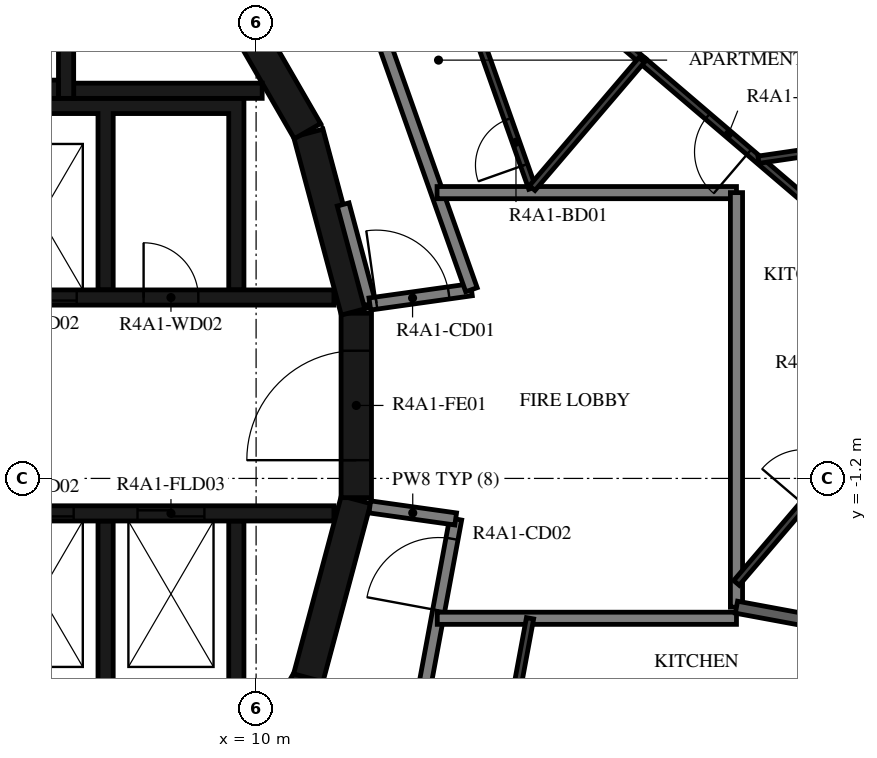
"""IFC4 building model, lengths in metres.
Left out: names, types, materials, properties, quantities, classifications, styles, units other than length and angle.
Written with IfcOpenShell. Run it as: python <this file> out.ifc"""

import sys

from ifc_helpers import new_model, si_unit, direction, frame, frame_2d, origin, place, context, subcontext, project, spatial, polyline, rectangle, outline, extrude, element, fill, save


model = new_model("IFC4")
c1 = context("Model", 3, precision=1e-05, world=origin(), true_north=direction((0.0, 1.0)))
c2 = subcontext(c1, "Body", "Model", "MODEL_VIEW")
j1 = project(units=[si_unit("LENGTHUNIT", "METRE"), si_unit("PLANEANGLEUNIT", "RADIAN")], contexts=[c1])
p1 = place(None, origin())
s1 = spatial("IfcSite", under=j1, at=p1, CompositionType="ELEMENT")
p2 = place(p1, origin())
s2 = spatial("IfcBuilding", under=s1, at=p2, CompositionType="ELEMENT")
p3 = place(p2, frame((0.0, 0.0, 155.2)))
s3 = spatial("IfcBuildingStorey", under=s2, at=p3, CompositionType="ELEMENT", Elevation=155.2)
for number, where, z_axis, x_axis in (
    (1, (9.329, -7.137, 0.0), (0.0, 0.0, 1.0), (0.5, 0.866, 0.0)),
    (2, (10.858, -4.479, 0.0), (0.0, 0.0, 1.0), (0.259, 0.966, 0.0)),
):
    element("IfcWall", number, at=place(p3, frame(where, z_axis=z_axis, x_axis=x_axis)), inside=s3, PredefinedType="SHEAR", context=c2, shape_type="SweptSolid", body=[
        extrude(rectangle(XDim=3.033, YDim=0.5, at=frame_2d((1.516, 0.0))), origin(), (0.0, 0.0, 1.0), 3.12),
    ])
p4 = place(p3, frame((11.647, -1.516, 0.0), z_axis=(0.0, 0.0, 1.0), x_axis=(0.0, 1.0, 0.0)))
e3 = element("IfcWall", 3, at=p4, inside=s3, PredefinedType="SHEAR", context=c2, shape_type="SweptSolid", body=[
    extrude(rectangle(XDim=3.033, YDim=0.5, at=frame_2d((1.516, 0.0))), origin(), (0.0, 0.0, 1.0), 3.12),
])
p5 = place(p4, frame((0.616, 0.0, 0.0)))
e4 = element("IfcOpeningElement", 4, at=p5, cuts=e3, PredefinedType="OPENING", context=c2, shape_type="SweptSolid", body=[
    extrude(rectangle(XDim=1.8, YDim=2.1, at=frame_2d((0.9, 1.05))), frame((0.0, 0.26, 0.0), z_axis=(0.0, -1.0, 0.0), x_axis=(1.0, 0.0, 0.0)), (0.0, 0.0, 1.0), 0.52),
])
for number, where, z_axis, x_axis in (
    (5, (11.643, 1.55, 0.0), (0.0, 0.0, 1.0), (-0.259, 0.966, 0.0)),
    (6, (10.845, 4.51, 0.0), (0.0, 0.0, 1.0), (-0.5, 0.866, 0.0)),
):
    element("IfcWall", number, at=place(p3, frame(where, z_axis=z_axis, x_axis=x_axis)), inside=s3, PredefinedType="SHEAR", context=c2, shape_type="SweptSolid", body=[
        extrude(rectangle(XDim=3.033, YDim=0.5, at=frame_2d((1.516, 0.0))), origin(), (0.0, 0.0, 1.0), 3.12),
    ])
p6 = place(p3, frame((0.0, 5.2, 0.0), z_axis=(0.0, 0.0, 1.0), x_axis=(1.0, 0.0, 0.0)))
e7 = element("IfcWall", 7, at=p6, inside=s3, PredefinedType="SHEAR", context=c2, shape_type="SweptSolid", body=[
    extrude(rectangle(XDim=6.75, YDim=0.3, at=frame_2d((3.375, 0.0))), origin(), (0.0, 0.0, 1.0), 3.12),
])
p7 = place(p3, frame((6.875, 5.05, 0.0), z_axis=(0.0, 0.0, 1.0), x_axis=(0.0, 1.0, 0.0)))
e8 = element("IfcWall", 8, at=p7, inside=s3, PredefinedType="SHEAR", context=c2, shape_type="SweptSolid", body=[
    extrude(rectangle(XDim=3.92, YDim=0.25, at=frame_2d((1.96, 0.0))), origin(), (0.0, 0.0, 1.0), 3.12),
])
p8 = place(p7, frame((1.11, 0.0, 0.0)))
e9 = element("IfcOpeningElement", 9, at=p8, cuts=e8, PredefinedType="OPENING", context=c2, shape_type="SweptSolid", body=[
    extrude(rectangle(XDim=1.2, YDim=2.1, at=frame_2d((0.6, 1.05))), frame((0.0, 0.135, 0.0), z_axis=(0.0, -1.0, 0.0), x_axis=(1.0, 0.0, 0.0)), (0.0, 0.0, 1.0), 0.27),
])
p9 = place(p3, frame((7.0, 5.175, 0.0), z_axis=(0.0, 0.0, 1.0), x_axis=(1.0, 0.0, 0.0)))
e10 = element("IfcWall", 10, at=p9, inside=s3, PredefinedType="SHEAR", context=c2, shape_type="SweptSolid", body=[
    extrude(rectangle(XDim=3.1, YDim=0.25, at=frame_2d((1.55, 0.0))), origin(), (0.0, 0.0, 1.0), 3.12),
])
p10 = place(p3, origin())
e11 = element("IfcWall", 11, at=p10, inside=s3, PredefinedType="SHEAR", context=c2, shape_type="SweptSolid", body=[
    extrude(outline(polyline([(-9.55, 4.8), (-1.2, 4.8), (-1.2, 1.9), (-0.95, 1.9), (-0.95, 4.8), (0.95, 4.8), (0.95, 1.9), (1.2, 1.9), (1.2, 4.8), (3.1, 4.8), (3.1, 1.9), (3.35, 1.9), (3.35, 4.8), (5.25, 4.8), (5.25, 1.9), (5.5, 1.9), (5.5, 4.8), (7.4, 4.8), (7.4, 1.9), (7.65, 1.9), (7.65, 4.8), (9.55, 4.8), (9.55, 1.9), (9.8, 1.9), (9.8, 4.8), (9.8, 5.05), (-9.8, 5.05), (-9.8, 4.8), (-9.8, 1.9), (-9.55, 1.9), (-9.55, 4.8)])), origin(), (0.0, 0.0, 1.0), 3.12),
])
p11 = place(p3, origin())
e12 = element("IfcWall", 12, at=p11, inside=s3, PredefinedType="SHEAR", context=c2, shape_type="SweptSolid", body=[
    extrude(outline(polyline([(9.8, -5.05), (9.8, -4.8), (9.8, -1.9), (9.55, -1.9), (9.55, -4.8), (7.65, -4.8), (7.65, -1.9), (7.4, -1.9), (7.4, -4.8), (5.5, -4.8), (5.5, -1.9), (5.25, -1.9), (5.25, -4.8), (3.35, -4.8), (3.35, -1.9), (3.1, -1.9), (3.1, -4.8), (1.2, -4.8), (1.2, -1.9), (0.95, -1.9), (0.95, -4.8), (-0.95, -4.8), (-0.95, -1.9), (-1.2, -1.9), (-1.2, -4.8), (-3.1, -4.8), (-3.1, -1.9), (-3.35, -1.9), (-3.35, -4.8), (-5.25, -4.8), (-5.25, -1.9), (-5.5, -1.9), (-5.5, -4.8), (-7.4, -4.8), (-7.4, -1.9), (-7.65, -1.9), (-7.65, -4.8), (-9.55, -4.8), (-9.55, -1.9), (-9.8, -1.9), (-9.8, -4.8), (-9.8, -5.05), (9.8, -5.05)])), origin(), (0.0, 0.0, 1.0), 3.12),
])
p12 = place(p3, frame((3.35, 1.775, 0.0), z_axis=(0.0, 0.0, 1.0), x_axis=(1.0, 0.0, 0.0)))
e13 = element("IfcWall", 13, at=p12, inside=s3, PredefinedType="SHEAR", context=c2, shape_type="SweptSolid", body=[
    extrude(rectangle(XDim=7.93, YDim=0.25, at=frame_2d((3.965, 0.0))), origin(), (0.0, 0.0, 1.0), 3.12),
])
p13 = place(p12, frame((0.35, 0.0, 0.0)))
e14 = element("IfcOpeningElement", 14, at=p13, cuts=e13, PredefinedType="OPENING", context=c2, shape_type="SweptSolid", body=[
    extrude(rectangle(XDim=1.2, YDim=2.4, at=frame_2d((0.6, 1.2))), frame((0.0, 0.135, 0.0), z_axis=(0.0, -1.0, 0.0), x_axis=(1.0, 0.0, 0.0)), (0.0, 0.0, 1.0), 0.27),
])
p14 = place(p12, frame((2.5, 0.0, 0.0)))
e15 = element("IfcOpeningElement", 15, at=p14, cuts=e13, PredefinedType="OPENING", context=c2, shape_type="SweptSolid", body=[
    extrude(rectangle(XDim=1.2, YDim=2.4, at=frame_2d((0.6, 1.2))), frame((0.0, 0.135, 0.0), z_axis=(0.0, -1.0, 0.0), x_axis=(1.0, 0.0, 0.0)), (0.0, 0.0, 1.0), 0.27),
])
p15 = place(p12, frame((4.8, 0.0, 0.0)))
e16 = element("IfcOpeningElement", 16, at=p15, cuts=e13, PredefinedType="OPENING", context=c2, shape_type="SweptSolid", body=[
    extrude(rectangle(XDim=0.9, YDim=2.1, at=frame_2d((0.45, 1.05))), frame((0.0, 0.135, 0.0), z_axis=(0.0, -1.0, 0.0), x_axis=(1.0, 0.0, 0.0)), (0.0, 0.0, 1.0), 0.27),
])
p16 = place(p3, frame((3.35, -1.775, 0.0), z_axis=(0.0, 0.0, 1.0), x_axis=(1.0, 0.0, 0.0)))
e17 = element("IfcWall", 17, at=p16, inside=s3, PredefinedType="SHEAR", context=c2, shape_type="SweptSolid", body=[
    extrude(rectangle(XDim=7.93, YDim=0.25, at=frame_2d((3.965, 0.0))), origin(), (0.0, 0.0, 1.0), 3.12),
])
p17 = place(p16, frame((0.4, 0.0, 0.0)))
e18 = element("IfcOpeningElement", 18, at=p17, cuts=e17, PredefinedType="OPENING", context=c2, shape_type="SweptSolid", body=[
    extrude(rectangle(XDim=1.1, YDim=2.4, at=frame_2d((0.55, 1.2))), frame((0.0, 0.135, 0.0), z_axis=(0.0, -1.0, 0.0), x_axis=(1.0, 0.0, 0.0)), (0.0, 0.0, 1.0), 0.27),
])
p18 = place(p16, frame((2.55, 0.0, 0.0)))
e19 = element("IfcOpeningElement", 19, at=p18, cuts=e17, PredefinedType="OPENING", context=c2, shape_type="SweptSolid", body=[
    extrude(rectangle(XDim=1.1, YDim=2.4, at=frame_2d((0.55, 1.2))), frame((0.0, 0.135, 0.0), z_axis=(0.0, -1.0, 0.0), x_axis=(1.0, 0.0, 0.0)), (0.0, 0.0, 1.0), 0.27),
])
p19 = place(p16, frame((4.7, 0.0, 0.0)))
e20 = element("IfcOpeningElement", 20, at=p19, cuts=e17, PredefinedType="OPENING", context=c2, shape_type="SweptSolid", body=[
    extrude(rectangle(XDim=1.1, YDim=2.4, at=frame_2d((0.55, 1.2))), frame((0.0, 0.135, 0.0), z_axis=(0.0, -1.0, 0.0), x_axis=(1.0, 0.0, 0.0)), (0.0, 0.0, 1.0), 0.27),
])
p20 = place(p3, frame((11.87, 1.668, 0.0), z_axis=(0.0, 0.0, 1.0), x_axis=(-0.258836880648, 0.965921047093, 0.0)))
e21 = element("IfcWall", 21, at=p20, inside=s3, PredefinedType="STANDARD", context=c2, shape_type="SweptSolid", body=[
    extrude(rectangle(XDim=1.695, YDim=0.2, at=frame_2d((0.848, 0.0))), origin(), (0.0, 0.0, 1.0), 3.12),
])
p21 = place(p3, frame((11.87, 1.668, 0.0), z_axis=(0.0, 0.0, 1.0), x_axis=(0.990270910415, 0.139152879904, 0.0)))
e22 = element("IfcWall", 22, at=p21, inside=s3, PredefinedType="STANDARD", context=c2, shape_type="SweptSolid", body=[
    extrude(rectangle(XDim=1.688, YDim=0.2, at=frame_2d((0.844, 0.0))), origin(), (0.0, 0.0, 1.0), 3.12),
])
p22 = place(p21, frame((0.11, 0.0, 0.0)))
e23 = element("IfcOpeningElement", 23, at=p22, cuts=e22, PredefinedType="OPENING", context=c2, shape_type="SweptSolid", body=[
    extrude(rectangle(XDim=1.2, YDim=2.1, at=frame_2d((0.6, 1.05))), frame((0.0, 0.11, 0.0), z_axis=(0.0, -1.0, 0.0), x_axis=(1.0, 0.0, 0.0)), (0.0, 0.0, 1.0), 0.22),
])
p23 = place(p3, frame((13.542, 1.903, 0.0), z_axis=(0.0, 0.0, 1.0), x_axis=(-0.333808508206, 0.942640907159, 0.0)))
e24 = element("IfcWall", 24, at=p23, inside=s3, PredefinedType="STANDARD", context=c2, shape_type="SweptSolid", body=[
    extrude(rectangle(XDim=6.317, YDim=0.2, at=frame_2d((3.158, 0.0))), origin(), (0.0, 0.0, 1.0), 3.12),
])
p24 = place(p3, frame((12.521, -5.972, 0.0), z_axis=(0.0, 0.0, 1.0), x_axis=(0.182244189886, 0.983253301674, 0.0)))
e25 = element("IfcWall", 25, at=p24, inside=s3, PredefinedType="STANDARD", context=c2, shape_type="SweptSolid", body=[
    extrude(rectangle(XDim=4.176, YDim=0.2, at=frame_2d((2.088, 0.0))), origin(), (0.0, 0.0, 1.0), 3.12),
])
p25 = place(p24, frame((2.645, 0.0, 0.0)))
e26 = element("IfcOpeningElement", 26, at=p25, cuts=e25, PredefinedType="OPENING", context=c2, shape_type="SweptSolid", body=[
    extrude(rectangle(XDim=1.2, YDim=2.1, at=frame_2d((0.6, 1.05))), frame((0.0, 0.11, 0.0), z_axis=(0.0, -1.0, 0.0), x_axis=(1.0, 0.0, 0.0)), (0.0, 0.0, 1.0), 0.22),
])
p26 = place(p3, frame((13.282, -1.867, 0.0), z_axis=(0.0, 0.0, 1.0), x_axis=(-0.990265430288, 0.139191873241, 0.0)))
e27 = element("IfcWall", 27, at=p26, inside=s3, PredefinedType="STANDARD", context=c2, shape_type="SweptSolid", body=[
    extrude(rectangle(XDim=1.426, YDim=0.2, at=frame_2d((0.713, 0.0))), origin(), (0.0, 0.0, 1.0), 3.12),
])
p27 = place(p3, frame((17.9, 3.5, 0.0), z_axis=(0.0, 0.0, 1.0), x_axis=(-1.0, 0.0, 0.0)))
e28 = element("IfcWall", 28, at=p27, inside=s3, PredefinedType="STANDARD", context=c2, shape_type="SweptSolid", body=[
    extrude(rectangle(XDim=4.924, YDim=0.2, at=frame_2d((2.462, 0.0))), origin(), (0.0, 0.0, 1.0), 3.12),
])
p28 = place(p3, frame((17.9, -3.318, 0.0), z_axis=(0.0, 0.0, 1.0), x_axis=(0.0, 1.0, 0.0)))
e29 = element("IfcWall", 29, at=p28, inside=s3, PredefinedType="STANDARD", context=c2, shape_type="SweptSolid", body=[
    extrude(rectangle(XDim=6.818, YDim=0.2, at=frame_2d((3.409, 0.0))), origin(), (0.0, 0.0, 1.0), 3.12),
])
p29 = place(p3, frame((12.979, -3.5, 0.0), z_axis=(0.0, 0.0, 1.0), x_axis=(1.0, 0.0, 0.0)))
e30 = element("IfcWall", 30, at=p29, inside=s3, PredefinedType="STANDARD", context=c2, shape_type="SweptSolid", body=[
    extrude(rectangle(XDim=4.92, YDim=0.2, at=frame_2d((2.46, 0.0))), origin(), (0.0, 0.0, 1.0), 3.12),
])
p30 = place(p3, frame((17.9, -3.318, 0.0), z_axis=(0.0, 0.0, 1.0), x_axis=(0.983252800712, -0.182246892682, 0.0)))
e31 = element("IfcWall", 31, at=p30, inside=s3, PredefinedType="STANDARD", context=c2, shape_type="SweptSolid", body=[
    extrude(rectangle(XDim=1.386, YDim=0.2, at=frame_2d((0.693, 0.0))), origin(), (0.0, 0.0, 1.0), 3.12),
])
p31 = place(p3, frame((14.541, 3.575, 0.0), z_axis=(0.0, 0.0, 1.0), x_axis=(-0.333799280318, 0.942644174893, 0.0)))
e32 = element("IfcWall", 32, at=p31, inside=s3, PredefinedType="PARTITIONING", context=c2, shape_type="SweptSolid", body=[
    extrude(rectangle(XDim=5.477, YDim=0.12, at=frame_2d((2.738, 0.0))), origin(), (0.0, 0.0, 1.0), 3.12),
])
p32 = place(p31, frame((0.4, 0.0, 0.0)))
e33 = element("IfcOpeningElement", 33, at=p32, cuts=e32, PredefinedType="OPENING", context=c2, shape_type="SweptSolid", body=[
    extrude(rectangle(XDim=0.8, YDim=2.1, at=frame_2d((0.4, 1.05))), frame((0.0, 0.07, 0.0), z_axis=(0.0, -1.0, 0.0), x_axis=(1.0, 0.0, 0.0)), (0.0, 0.0, 1.0), 0.14),
])
p33 = place(p3, frame((12.734, 8.762, 0.0), z_axis=(0.0, 0.0, 1.0), x_axis=(0.760390484255, -0.649466174219, 0.0)))
e34 = element("IfcWall", 34, at=p33, inside=s3, PredefinedType="PARTITIONING", context=c2, shape_type="SweptSolid", body=[
    extrude(rectangle(XDim=4.783, YDim=0.12, at=frame_2d((2.391, 0.0))), origin(), (0.0, 0.0, 1.0), 3.12),
])
p34 = place(p3, frame((23.411, -0.357, 0.0), z_axis=(0.0, 0.0, 1.0), x_axis=(-0.76041871148, 0.649433124525, 0.0)))
e35 = element("IfcWall", 35, at=p34, inside=s3, PredefinedType="PARTITIONING", context=c2, shape_type="SweptSolid", body=[
    extrude(rectangle(XDim=9.259, YDim=0.12, at=frame_2d((4.629, 0.0))), origin(), (0.0, 0.0, 1.0), 3.12),
])
p35 = place(p34, frame((6.972, 0.0, 0.0)))
e36 = element("IfcOpeningElement", 36, at=p35, cuts=e35, PredefinedType="OPENING", context=c2, shape_type="SweptSolid", body=[
    extrude(rectangle(XDim=0.9, YDim=2.1, at=frame_2d((0.45, 1.05))), frame((0.0, 0.07, 0.0), z_axis=(0.0, -1.0, 0.0), x_axis=(1.0, 0.0, 0.0)), (0.0, 0.0, 1.0), 0.14),
])
p36 = place(p34, frame((0.2, 0.0, 0.0)))
e37 = element("IfcOpeningElement", 37, at=p36, cuts=e35, PredefinedType="OPENING", context=c2, shape_type="SweptSolid", body=[
    extrude(rectangle(XDim=0.9, YDim=2.1, at=frame_2d((0.45, 1.05))), frame((0.0, 0.07, 0.0), z_axis=(0.0, -1.0, 0.0), x_axis=(1.0, 0.0, 0.0)), (0.0, 0.0, 1.0), 0.14),
])
p37 = place(p3, frame((16.341, 5.682, 0.0), z_axis=(0.0, 0.0, 1.0), x_axis=(-0.64946993237, -0.76038727432, 0.0)))
e38 = element("IfcWall", 38, at=p37, inside=s3, PredefinedType="PARTITIONING", context=c2, shape_type="SweptSolid", body=[
    extrude(rectangle(XDim=2.771, YDim=0.12, at=frame_2d((1.386, 0.0))), origin(), (0.0, 0.0, 1.0), 3.12),
])
p38 = place(p3, frame((17.9, -2.918, 0.0), z_axis=(0.0, 0.0, 1.0), x_axis=(0.649469887983, 0.760387312232, 0.0)))
e39 = element("IfcWall", 39, at=p38, inside=s3, PredefinedType="PARTITIONING", context=c2, shape_type="SweptSolid", body=[
    extrude(rectangle(XDim=5.527, YDim=0.12, at=frame_2d((2.763, 0.0))), origin(), (0.0, 0.0, 1.0), 3.12),
])
p39 = place(p38, frame((1.7, 0.0, 0.0)))
e40 = element("IfcOpeningElement", 40, at=p39, cuts=e39, PredefinedType="OPENING", context=c2, shape_type="SweptSolid", body=[
    extrude(rectangle(XDim=0.9, YDim=2.1, at=frame_2d((0.45, 1.05))), frame((0.0, 0.07, 0.0), z_axis=(0.0, -1.0, 0.0), x_axis=(1.0, 0.0, 0.0)), (0.0, 0.0, 1.0), 0.14),
])
p40 = place(p3, frame((22.994, 4.734, 0.0), z_axis=(0.0, 0.0, 1.0), x_axis=(-0.989449286977, -0.144879634529, 0.0)))
e41 = element("IfcWall", 41, at=p40, inside=s3, PredefinedType="PARTITIONING", context=c2, shape_type="SweptSolid", body=[
    extrude(rectangle(XDim=4.782, YDim=0.12, at=frame_2d((2.391, 0.0))), origin(), (0.0, 0.0, 1.0), 3.12),
])
p41 = place(p40, frame((0.7, 0.0, 0.0)))
e42 = element("IfcOpeningElement", 42, at=p41, cuts=e41, PredefinedType="OPENING", context=c2, shape_type="SweptSolid", body=[
    extrude(rectangle(XDim=0.9, YDim=2.1, at=frame_2d((0.45, 1.05))), frame((0.0, 0.07, 0.0), z_axis=(0.0, -1.0, 0.0), x_axis=(1.0, 0.0, 0.0)), (0.0, 0.0, 1.0), 0.14),
])
p42 = place(p3, frame((14.24, -4.928, 0.0), z_axis=(0.0, 0.0, 1.0), x_axis=(0.182329957282, 0.983237400976, 0.0)))
e43 = element("IfcWall", 43, at=p42, inside=s3, PredefinedType="PARTITIONING", context=c2, shape_type="SweptSolid", body=[
    extrude(rectangle(XDim=1.453, YDim=0.12, at=frame_2d((0.727, 0.0))), origin(), (0.0, 0.0, 1.0), 3.12),
])
p43 = place(p5, origin())
e44 = element("IfcDoor", 44, at=p43, inside=s3, OperationType="DOUBLE_DOOR_SINGLE_SWING", PredefinedType="DOOR", context=c2, shape_type="SweptSolid", body=[
    extrude(rectangle(XDim=1.8, YDim=2.1, at=frame_2d((0.9, 1.05))), frame((0.0, 0.025, 0.0), z_axis=(0.0, -1.0, 0.0), x_axis=(1.0, 0.0, 0.0)), (0.0, 0.0, 1.0), 0.05),
])
fill(e4, e44)
p44 = place(p14, origin())
e45 = element("IfcDoor", 45, at=p44, inside=s3, OperationType="DOUBLE_DOOR_SLIDING", PredefinedType="DOOR", context=c2, shape_type="SweptSolid", body=[
    extrude(rectangle(XDim=1.2, YDim=2.4, at=frame_2d((0.6, 1.2))), frame((0.0, 0.025, 0.0), z_axis=(0.0, -1.0, 0.0), x_axis=(1.0, 0.0, 0.0)), (0.0, 0.0, 1.0), 0.05),
])
fill(e15, e45)
p45 = place(p18, origin())
e46 = element("IfcDoor", 46, at=p45, inside=s3, OperationType="DOUBLE_DOOR_SLIDING", PredefinedType="DOOR", context=c2, shape_type="SweptSolid", body=[
    extrude(rectangle(XDim=1.1, YDim=2.4, at=frame_2d((0.55, 1.2))), frame((0.0, 0.025, 0.0), z_axis=(0.0, -1.0, 0.0), x_axis=(1.0, 0.0, 0.0)), (0.0, 0.0, 1.0), 0.05),
])
fill(e19, e46)
p46 = place(p19, origin())
e47 = element("IfcDoor", 47, at=p46, inside=s3, OperationType="DOUBLE_DOOR_SLIDING", PredefinedType="DOOR", context=c2, shape_type="SweptSolid", body=[
    extrude(rectangle(XDim=1.1, YDim=2.4, at=frame_2d((0.55, 1.2))), frame((0.0, 0.025, 0.0), z_axis=(0.0, -1.0, 0.0), x_axis=(1.0, 0.0, 0.0)), (0.0, 0.0, 1.0), 0.05),
])
fill(e20, e47)
p47 = place(p15, origin())
e48 = element("IfcDoor", 48, at=p47, inside=s3, OperationType="SINGLE_SWING_RIGHT", PredefinedType="DOOR", context=c2, shape_type="SweptSolid", body=[
    extrude(rectangle(XDim=0.9, YDim=2.1, at=frame_2d((0.45, 1.05))), frame((0.0, 0.025, 0.0), z_axis=(0.0, -1.0, 0.0), x_axis=(1.0, 0.0, 0.0)), (0.0, 0.0, 1.0), 0.05),
])
fill(e16, e48)
p48 = place(p32, origin())
e49 = element("IfcDoor", 49, at=p48, inside=s3, OperationType="SINGLE_SWING_LEFT", PredefinedType="DOOR", context=c2, shape_type="SweptSolid", body=[
    extrude(rectangle(XDim=0.8, YDim=2.1, at=frame_2d((0.4, 1.05))), frame((0.0, 0.025, 0.0), z_axis=(0.0, -1.0, 0.0), x_axis=(1.0, 0.0, 0.0)), (0.0, 0.0, 1.0), 0.05),
])
fill(e33, e49)
p49 = place(p35, origin())
e50 = element("IfcDoor", 50, at=p49, inside=s3, OperationType="SINGLE_SWING_RIGHT", PredefinedType="DOOR", context=c2, shape_type="SweptSolid", body=[
    extrude(rectangle(XDim=0.9, YDim=2.1, at=frame_2d((0.45, 1.05))), frame((0.0, 0.025, 0.0), z_axis=(0.0, -1.0, 0.0), x_axis=(1.0, 0.0, 0.0)), (0.0, 0.0, 1.0), 0.05),
])
fill(e36, e50)
p50 = place(p22, origin())
e51 = element("IfcDoor", 51, at=p50, inside=s3, OperationType="DOUBLE_DOOR_SINGLE_SWING", PredefinedType="DOOR", context=c2, shape_type="SweptSolid", body=[
    extrude(rectangle(XDim=1.2, YDim=2.1, at=frame_2d((0.6, 1.05))), frame((0.0, 0.025, 0.0), z_axis=(0.0, -1.0, 0.0), x_axis=(1.0, 0.0, 0.0)), (0.0, 0.0, 1.0), 0.05),
])
fill(e23, e51)
p51 = place(p25, origin())
e52 = element("IfcDoor", 52, at=p51, inside=s3, OperationType="DOUBLE_DOOR_SINGLE_SWING", PredefinedType="DOOR", context=c2, shape_type="SweptSolid", body=[
    extrude(rectangle(XDim=1.2, YDim=2.1, at=frame_2d((0.6, 1.05))), frame((0.0, 0.025, 0.0), z_axis=(0.0, -1.0, 0.0), x_axis=(1.0, 0.0, 0.0)), (0.0, 0.0, 1.0), 0.05),
])
fill(e26, e52)
save(model, sys.argv[1])
